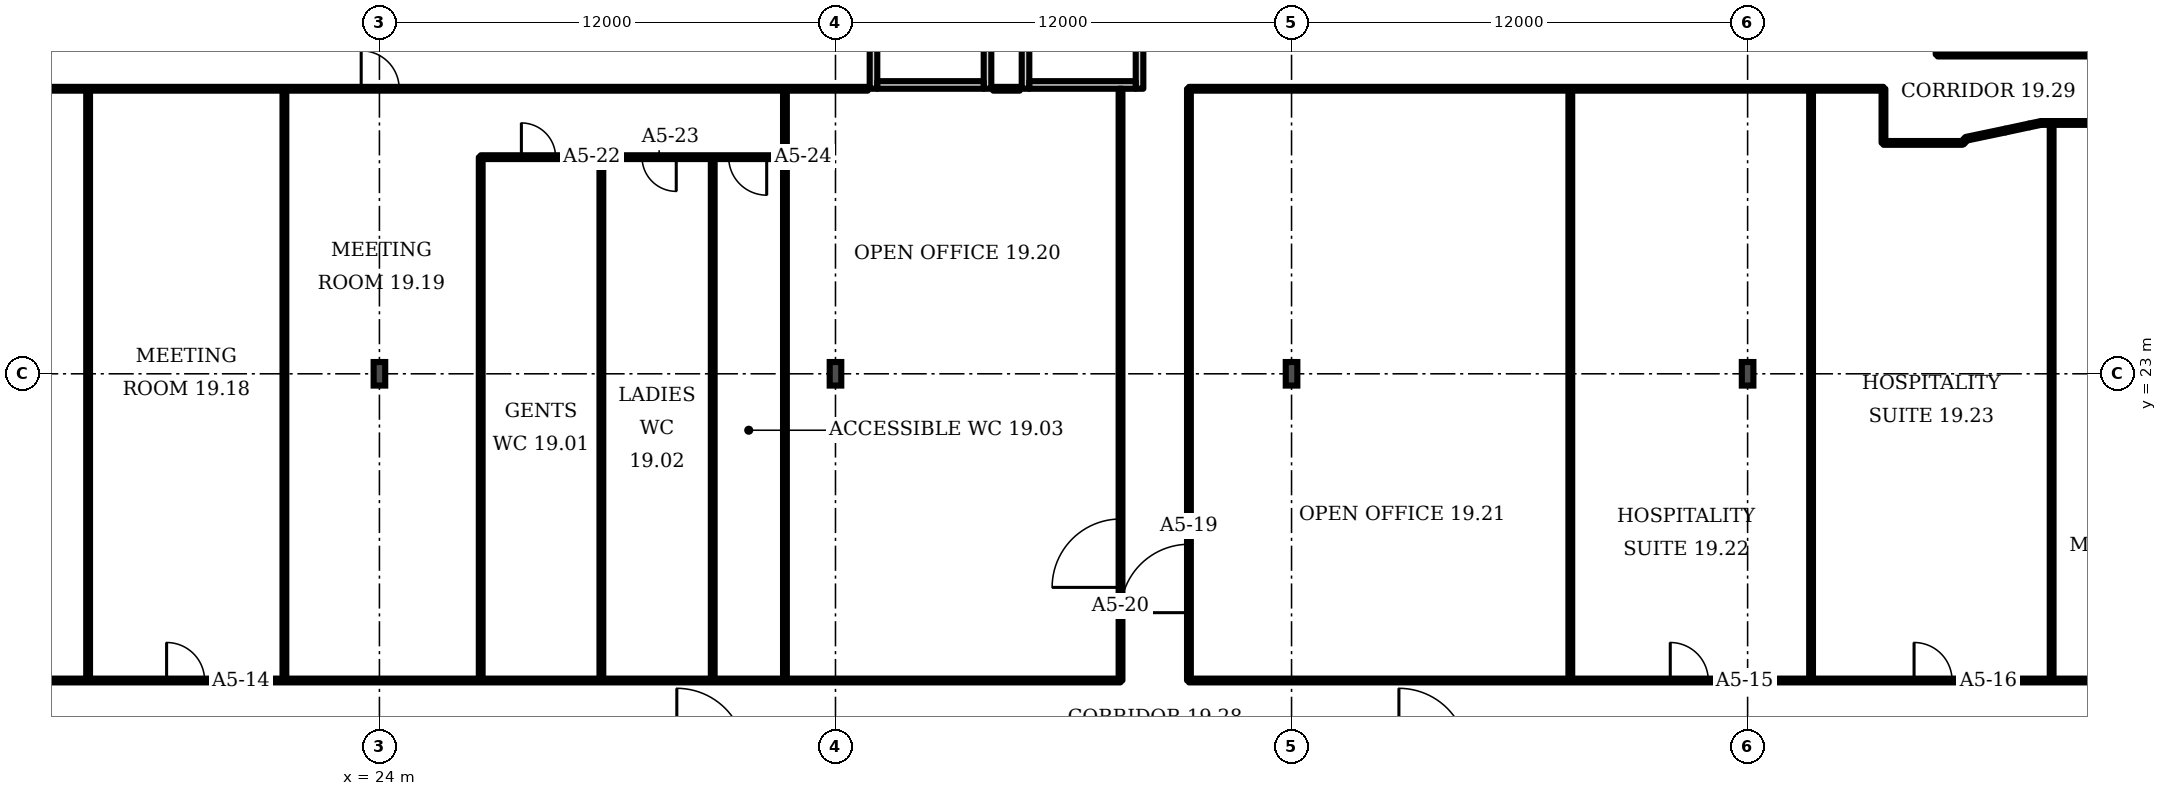
"""IFC4 building model, lengths in metres.
Left out: names, types, materials, properties, quantities, classifications, styles, units other than length and angle.
Written with IfcOpenShell. Run it as: python <this file> out.ifc"""

import sys

from ifc_helpers import new_model, si_unit, direction, frame, frame_2d, origin, origin_2d, place, context, subcontext, project, spatial, rectangle, i_section, extrude, element, fill, save


model = new_model("IFC4")
c1 = context("Model", 3, precision=1e-05, world=origin(), true_north=direction((0.0, 1.0)))
c2 = subcontext(c1, "Body", "Model", "MODEL_VIEW")
j1 = project(units=[si_unit("LENGTHUNIT", "METRE"), si_unit("PLANEANGLEUNIT", "RADIAN")], contexts=[c1])
p1 = place(None, origin())
s1 = spatial("IfcSite", under=j1, at=p1, CompositionType="ELEMENT")
p2 = place(p1, origin())
s2 = spatial("IfcBuilding", under=s1, at=p2, CompositionType="ELEMENT")
p3 = place(p2, frame((0.0, 0.0, 88.3)))
s3 = spatial("IfcBuildingStorey", under=s2, at=p3, CompositionType="ELEMENT", Elevation=88.3)
for number, where, z_axis, x_axis in (
    (1, (24.0, 23.0, 0.0), (0.0, 0.0, 1.0), (1.0, 0.0, 0.0)),
    (2, (36.0, 23.0, 0.0), (0.0, 0.0, 1.0), (1.0, 0.0, 0.0)),
    (3, (48.0, 23.0, 0.0), (0.0, 0.0, 1.0), (1.0, 0.0, 0.0)),
    (4, (60.0, 23.0, 0.0), (0.0, 0.0, 1.0), (1.0, 0.0, 0.0)),
):
    element("IfcColumn", number, at=place(p3, frame(where, z_axis=z_axis, x_axis=x_axis)), inside=s3, PredefinedType="COLUMN", context=c2, shape_type="SweptSolid", body=[
        extrude(i_section(OverallWidth=0.305, OverallDepth=0.62, WebThickness=0.021, FlangeThickness=0.04, FilletRadius=0.027, at=origin_2d()), origin(), (0.0, 0.0, 1.0), 3.6),
    ])
p4 = place(p3, frame((37.0, 30.5, 0.0), z_axis=(0.0, 0.0, 1.0), x_axis=(0.0, 1.0, 0.0)))
e5 = element("IfcWall", 5, at=p4, inside=s3, PredefinedType="PARTITIONING", context=c2, shape_type="SweptSolid", body=[
    extrude(rectangle(XDim=3.5, YDim=0.2, at=frame_2d((1.75, 0.0))), origin(), (0.0, 0.0, 1.0), 3.15),
])
p5 = place(p4, frame((1.2, 0.0, 0.0)))
e6 = element("IfcOpeningElement", 6, at=p5, cuts=e5, PredefinedType="OPENING", context=c2, shape_type="SweptSolid", body=[
    extrude(rectangle(XDim=1.1, YDim=2.1, at=frame_2d((0.55, 1.05))), frame((0.0, 0.11, 0.0), z_axis=(0.0, -1.0, 0.0), x_axis=(1.0, 0.0, 0.0)), (0.0, 0.0, 1.0), 0.22),
])
p6 = place(p3, frame((40.0, 30.5, 0.0), z_axis=(0.0, 0.0, 1.0), x_axis=(0.0, 1.0, 0.0)))
e7 = element("IfcWall", 7, at=p6, inside=s3, PredefinedType="PARTITIONING", context=c2, shape_type="SweptSolid", body=[
    extrude(rectangle(XDim=3.5, YDim=0.2, at=frame_2d((1.75, 0.0))), origin(), (0.0, 0.0, 1.0), 3.15),
])
p7 = place(p3, frame((37.1, 30.6, 0.0), z_axis=(0.0, 0.0, 1.0), x_axis=(1.0, 0.0, 0.0)))
e8 = element("IfcWall", 8, at=p7, inside=s3, PredefinedType="PARTITIONING", context=c2, shape_type="SweptSolid", body=[
    extrude(rectangle(XDim=2.8, YDim=0.2, at=frame_2d((1.4, 0.0))), origin(), (0.0, 0.0, 1.0), 3.15),
])
p8 = place(p3, frame((41.0, 30.5, 0.0), z_axis=(0.0, 0.0, 1.0), x_axis=(0.0, 1.0, 0.0)))
e9 = element("IfcWall", 9, at=p8, inside=s3, PredefinedType="PARTITIONING", context=c2, shape_type="SweptSolid", body=[
    extrude(rectangle(XDim=3.5, YDim=0.2, at=frame_2d((1.75, 0.0))), origin(), (0.0, 0.0, 1.0), 3.15),
])
p9 = place(p3, frame((44.0, 30.5, 0.0), z_axis=(0.0, 0.0, 1.0), x_axis=(0.0, 1.0, 0.0)))
e10 = element("IfcWall", 10, at=p9, inside=s3, PredefinedType="PARTITIONING", context=c2, shape_type="SweptSolid", body=[
    extrude(rectangle(XDim=3.5, YDim=0.2, at=frame_2d((1.75, 0.0))), origin(), (0.0, 0.0, 1.0), 3.15),
])
p10 = place(p9, frame((1.2, 0.0, 0.0)))
e11 = element("IfcOpeningElement", 11, at=p10, cuts=e10, PredefinedType="OPENING", context=c2, shape_type="SweptSolid", body=[
    extrude(rectangle(XDim=1.1, YDim=2.1, at=frame_2d((0.55, 1.05))), frame((0.0, 0.11, 0.0), z_axis=(0.0, -1.0, 0.0), x_axis=(1.0, 0.0, 0.0)), (0.0, 0.0, 1.0), 0.22),
])
p11 = place(p3, frame((41.1, 30.6, 0.0), z_axis=(0.0, 0.0, 1.0), x_axis=(1.0, 0.0, 0.0)))
e12 = element("IfcWall", 12, at=p11, inside=s3, PredefinedType="PARTITIONING", context=c2, shape_type="SweptSolid", body=[
    extrude(rectangle(XDim=2.8, YDim=0.2, at=frame_2d((1.4, 0.0))), origin(), (0.0, 0.0, 1.0), 3.15),
])
p12 = place(p3, frame((9.0, 30.5, 0.0), z_axis=(0.0, 0.0, 1.0), x_axis=(1.0, 0.0, 0.0)))
e13 = element("IfcWall", 13, at=p12, inside=s3, PredefinedType="PARTITIONING", context=c2, shape_type="SweptSolid", body=[
    extrude(rectangle(XDim=27.85, YDim=0.1, at=frame_2d((13.925, 0.0))), origin(), (0.0, 0.0, 1.0), 3.15),
])
p13 = place(p12, frame((14.52, 0.0, 0.0)))
e14 = element("IfcOpeningElement", 14, at=p13, cuts=e13, PredefinedType="OPENING", context=c2, shape_type="SweptSolid", body=[
    extrude(rectangle(XDim=1.0, YDim=2.1, at=frame_2d((0.5, 1.05))), frame((0.0, 0.06, 0.0), z_axis=(0.0, -1.0, 0.0), x_axis=(1.0, 0.0, 0.0)), (0.0, 0.0, 1.0), 0.12),
])
p14 = place(p3, frame((10.8, 14.93, 0.0), z_axis=(0.0, 0.0, 1.0), x_axis=(1.0, 0.0, 0.0)))
e15 = element("IfcWall", 15, at=p14, inside=s3, PredefinedType="PARTITIONING", context=c2, shape_type="SweptSolid", body=[
    extrude(rectangle(XDim=32.7, YDim=0.1, at=frame_2d((16.35, 0.0))), origin(), (0.0, 0.0, 1.0), 3.15),
])
p15 = place(p14, frame((7.6, 0.0, 0.0)))
e16 = element("IfcOpeningElement", 16, at=p15, cuts=e15, PredefinedType="OPENING", context=c2, shape_type="SweptSolid", body=[
    extrude(rectangle(XDim=1.0, YDim=2.1, at=frame_2d((0.5, 1.05))), frame((0.0, 0.06, 0.0), z_axis=(0.0, -1.0, 0.0), x_axis=(1.0, 0.0, 0.0)), (0.0, 0.0, 1.0), 0.12),
])
for number, where, z_axis, x_axis in (
    (17, (16.335, 14.93, 0.0), (0.0, 0.0, 1.0), (0.0, 1.0, 0.0)),
    (18, (21.5, 14.93, 0.0), (0.0, 0.0, 1.0), (0.0, 1.0, 0.0)),
):
    element("IfcWall", number, at=place(p3, frame(where, z_axis=z_axis, x_axis=x_axis)), inside=s3, PredefinedType="PARTITIONING", context=c2, shape_type="SweptSolid", body=[
        extrude(rectangle(XDim=15.57, YDim=0.1, at=frame_2d((7.785, 0.0))), origin(), (0.0, 0.0, 1.0), 3.15),
    ])
p16 = place(p3, frame((26.665, 14.93, 0.0), z_axis=(0.0, 0.0, 1.0), x_axis=(0.0, 1.0, 0.0)))
e19 = element("IfcWall", 19, at=p16, inside=s3, PredefinedType="PARTITIONING", context=c2, shape_type="SweptSolid", body=[
    extrude(rectangle(XDim=13.77, YDim=0.1, at=frame_2d((6.885, 0.0))), origin(), (0.0, 0.0, 1.0), 3.15),
])
p17 = place(p3, frame((26.665, 28.7, 0.0), z_axis=(0.0, 0.0, 1.0), x_axis=(1.0, 0.0, 0.0)))
e20 = element("IfcWall", 20, at=p17, inside=s3, PredefinedType="PARTITIONING", context=c2, shape_type="SweptSolid", body=[
    extrude(rectangle(XDim=8.0, YDim=0.1, at=frame_2d((4.0, 0.0))), origin(), (0.0, 0.0, 1.0), 3.15),
])
p18 = place(p17, frame((1.07, 0.0, 0.0)))
e21 = element("IfcOpeningElement", 21, at=p18, cuts=e20, PredefinedType="OPENING", context=c2, shape_type="SweptSolid", body=[
    extrude(rectangle(XDim=0.9, YDim=2.1, at=frame_2d((0.45, 1.05))), frame((0.0, 0.06, 0.0), z_axis=(0.0, -1.0, 0.0), x_axis=(1.0, 0.0, 0.0)), (0.0, 0.0, 1.0), 0.12),
])
p19 = place(p17, frame((4.245, 0.0, 0.0)))
e22 = element("IfcOpeningElement", 22, at=p19, cuts=e20, PredefinedType="OPENING", context=c2, shape_type="SweptSolid", body=[
    extrude(rectangle(XDim=0.9, YDim=2.1, at=frame_2d((0.45, 1.05))), frame((0.0, 0.06, 0.0), z_axis=(0.0, -1.0, 0.0), x_axis=(1.0, 0.0, 0.0)), (0.0, 0.0, 1.0), 0.12),
])
p20 = place(p17, frame((6.525, 0.0, 0.0)))
e23 = element("IfcOpeningElement", 23, at=p20, cuts=e20, PredefinedType="OPENING", context=c2, shape_type="SweptSolid", body=[
    extrude(rectangle(XDim=1.0, YDim=2.1, at=frame_2d((0.5, 1.05))), frame((0.0, 0.06, 0.0), z_axis=(0.0, -1.0, 0.0), x_axis=(1.0, 0.0, 0.0)), (0.0, 0.0, 1.0), 0.12),
])
for number, where, z_axis, x_axis in (
    (24, (29.84, 14.93, 0.0), (0.0, 0.0, 1.0), (0.0, 1.0, 0.0)),
    (25, (32.77, 14.93, 0.0), (0.0, 0.0, 1.0), (0.0, 1.0, 0.0)),
):
    element("IfcWall", number, at=place(p3, frame(where, z_axis=z_axis, x_axis=x_axis)), inside=s3, PredefinedType="PARTITIONING", context=c2, shape_type="SweptSolid", body=[
        extrude(rectangle(XDim=13.77, YDim=0.1, at=frame_2d((6.885, 0.0))), origin(), (0.0, 0.0, 1.0), 3.15),
    ])
p21 = place(p3, frame((34.67, 14.93, 0.0), z_axis=(0.0, 0.0, 1.0), x_axis=(0.0, 1.0, 0.0)))
e26 = element("IfcWall", 26, at=p21, inside=s3, PredefinedType="PARTITIONING", context=c2, shape_type="SweptSolid", body=[
    extrude(rectangle(XDim=15.56, YDim=0.1, at=frame_2d((7.78, 0.0))), origin(), (0.0, 0.0, 1.0), 3.15),
])
p22 = place(p3, frame((43.5, 14.93, 0.0), z_axis=(0.0, 0.0, 1.0), x_axis=(0.0, 1.0, 0.0)))
e27 = element("IfcWall", 27, at=p22, inside=s3, PredefinedType="PARTITIONING", context=c2, shape_type="SweptSolid", body=[
    extrude(rectangle(XDim=15.57, YDim=0.1, at=frame_2d((7.785, 0.0))), origin(), (0.0, 0.0, 1.0), 3.15),
])
p23 = place(p22, frame((2.45, 0.0, 0.0)))
e28 = element("IfcOpeningElement", 28, at=p23, cuts=e27, PredefinedType="OPENING", context=c2, shape_type="SweptSolid", body=[
    extrude(rectangle(XDim=1.8, YDim=2.1, at=frame_2d((0.9, 1.05))), frame((0.0, 0.06, 0.0), z_axis=(0.0, -1.0, 0.0), x_axis=(1.0, 0.0, 0.0)), (0.0, 0.0, 1.0), 0.12),
])
p24 = place(p3, frame((45.3, 14.93, 0.0), z_axis=(0.0, 0.0, 1.0), x_axis=(0.0, 1.0, 0.0)))
e29 = element("IfcWall", 29, at=p24, inside=s3, PredefinedType="PARTITIONING", context=c2, shape_type="SweptSolid", body=[
    extrude(rectangle(XDim=15.57, YDim=0.1, at=frame_2d((7.785, 0.0))), origin(), (0.0, 0.0, 1.0), 3.15),
])
p25 = place(p24, frame((1.785, 0.0, 0.0)))
e30 = element("IfcOpeningElement", 30, at=p25, cuts=e29, PredefinedType="OPENING", context=c2, shape_type="SweptSolid", body=[
    extrude(rectangle(XDim=1.8, YDim=2.1, at=frame_2d((0.9, 1.05))), frame((0.0, 0.06, 0.0), z_axis=(0.0, -1.0, 0.0), x_axis=(1.0, 0.0, 0.0)), (0.0, 0.0, 1.0), 0.12),
])
p26 = place(p3, frame((45.3, 14.93, 0.0), z_axis=(0.0, 0.0, 1.0), x_axis=(1.0, 0.0, 0.0)))
e31 = element("IfcWall", 31, at=p26, inside=s3, PredefinedType="PARTITIONING", context=c2, shape_type="SweptSolid", body=[
    extrude(rectangle(XDim=40.43, YDim=0.1, at=frame_2d((20.215, 0.0))), origin(), (0.0, 0.0, 1.0), 3.15),
])
p27 = place(p26, frame((12.665, 0.0, 0.0)))
e32 = element("IfcOpeningElement", 32, at=p27, cuts=e31, PredefinedType="OPENING", context=c2, shape_type="SweptSolid", body=[
    extrude(rectangle(XDim=1.0, YDim=2.1, at=frame_2d((0.5, 1.05))), frame((0.0, 0.06, 0.0), z_axis=(0.0, -1.0, 0.0), x_axis=(1.0, 0.0, 0.0)), (0.0, 0.0, 1.0), 0.12),
])
p28 = place(p26, frame((19.08, 0.0, 0.0)))
e33 = element("IfcOpeningElement", 33, at=p28, cuts=e31, PredefinedType="OPENING", context=c2, shape_type="SweptSolid", body=[
    extrude(rectangle(XDim=1.0, YDim=2.1, at=frame_2d((0.5, 1.05))), frame((0.0, 0.06, 0.0), z_axis=(0.0, -1.0, 0.0), x_axis=(1.0, 0.0, 0.0)), (0.0, 0.0, 1.0), 0.12),
])
p29 = place(p26, frame((37.015, 0.0, 0.0)))
e34 = element("IfcOpeningElement", 34, at=p29, cuts=e31, PredefinedType="OPENING", context=c2, shape_type="SweptSolid", body=[
    extrude(rectangle(XDim=1.0, YDim=2.1, at=frame_2d((0.5, 1.05))), frame((0.0, 0.06, 0.0), z_axis=(0.0, -1.0, 0.0), x_axis=(1.0, 0.0, 0.0)), (0.0, 0.0, 1.0), 0.12),
])
p30 = place(p3, frame((45.3, 30.5, 0.0), z_axis=(0.0, 0.0, 1.0), x_axis=(1.0, 0.0, 0.0)))
e35 = element("IfcWall", 35, at=p30, inside=s3, PredefinedType="PARTITIONING", context=c2, shape_type="SweptSolid", body=[
    extrude(rectangle(XDim=18.275, YDim=0.1, at=frame_2d((9.137, 0.0))), origin(), (0.0, 0.0, 1.0), 3.15),
])
for number, where, z_axis, x_axis in (
    (36, (55.335, 14.93, 0.0), (0.0, 0.0, 1.0), (0.0, 1.0, 0.0)),
    (37, (61.67, 14.93, 0.0), (0.0, 0.0, 1.0), (0.0, 1.0, 0.0)),
):
    element("IfcWall", number, at=place(p3, frame(where, z_axis=z_axis, x_axis=x_axis)), inside=s3, PredefinedType="PARTITIONING", context=c2, shape_type="SweptSolid", body=[
        extrude(rectangle(XDim=15.57, YDim=0.1, at=frame_2d((7.785, 0.0))), origin(), (0.0, 0.0, 1.0), 3.15),
    ])
p31 = place(p3, frame((63.575, 29.075, 0.0), z_axis=(0.0, 0.0, 1.0), x_axis=(0.0, 1.0, 0.0)))
e38 = element("IfcWall", 38, at=p31, inside=s3, PredefinedType="PARTITIONING", context=c2, shape_type="SweptSolid", body=[
    extrude(rectangle(XDim=1.425, YDim=0.1, at=frame_2d((0.712, 0.0))), origin(), (0.0, 0.0, 1.0), 3.15),
])
p32 = place(p3, frame((63.575, 29.075, 0.0), z_axis=(0.0, 0.0, 1.0), x_axis=(1.0, 0.0, 0.0)))
e39 = element("IfcWall", 39, at=p32, inside=s3, PredefinedType="PARTITIONING", context=c2, shape_type="SweptSolid", body=[
    extrude(rectangle(XDim=2.08, YDim=0.1, at=frame_2d((1.04, 0.0))), origin(), (0.0, 0.0, 1.0), 3.15),
])
p33 = place(p3, frame((65.0, 31.4, 0.0), z_axis=(0.0, 0.0, 1.0), x_axis=(0.0, 1.0, 0.0)))
e40 = element("IfcWall", 40, at=p33, inside=s3, PredefinedType="PARTITIONING", context=c2, shape_type="SweptSolid", body=[
    extrude(rectangle(XDim=2.58, YDim=0.1, at=frame_2d((1.29, 0.0))), origin(), (0.0, 0.0, 1.0), 3.15),
])
p34 = place(p33, frame((0.9, 0.0, 0.0)))
e41 = element("IfcOpeningElement", 41, at=p34, cuts=e40, PredefinedType="OPENING", context=c2, shape_type="SweptSolid", body=[
    extrude(rectangle(XDim=1.0, YDim=2.1, at=frame_2d((0.5, 1.05))), frame((0.0, 0.06, 0.0), z_axis=(0.0, -1.0, 0.0), x_axis=(1.0, 0.0, 0.0)), (0.0, 0.0, 1.0), 0.12),
])
p35 = place(p3, frame((65.0, 31.4, 0.0), z_axis=(0.0, 0.0, 1.0), x_axis=(1.0, 0.0, 0.0)))
e42 = element("IfcWall", 42, at=p35, inside=s3, PredefinedType="PARTITIONING", context=c2, shape_type="SweptSolid", body=[
    extrude(rectangle(XDim=7.125, YDim=0.1, at=frame_2d((3.562, 0.0))), origin(), (0.0, 0.0, 1.0), 3.15),
])
p36 = place(p35, frame((5.705, 0.0, 0.0)))
e43 = element("IfcOpeningElement", 43, at=p36, cuts=e42, PredefinedType="OPENING", context=c2, shape_type="SweptSolid", body=[
    extrude(rectangle(XDim=1.0, YDim=2.1, at=frame_2d((0.5, 1.05))), frame((0.0, 0.06, 0.0), z_axis=(0.0, -1.0, 0.0), x_axis=(1.0, 0.0, 0.0)), (0.0, 0.0, 1.0), 0.12),
])
p37 = place(p3, frame((65.655, 29.075, 0.0), z_axis=(0.0, 0.0, 1.0), x_axis=(0.671773, 0.740757, 0.0)))
e44 = element("IfcWall", 44, at=p37, inside=s3, PredefinedType="PARTITIONING", context=c2, shape_type="SweptSolid", body=[
    extrude(rectangle(XDim=0.149, YDim=0.1, at=frame_2d((0.074, 0.0))), origin(), (0.0, 0.0, 1.0), 3.15),
])
p38 = place(p3, frame((65.755, 29.185, 0.0), z_axis=(0.0, 0.0, 1.0), x_axis=(0.978739, 0.205118, 0.0)))
e45 = element("IfcWall", 45, at=p38, inside=s3, PredefinedType="PARTITIONING", context=c2, shape_type="SweptSolid", body=[
    extrude(rectangle(XDim=1.047, YDim=0.1, at=frame_2d((0.524, 0.0))), origin(), (0.0, 0.0, 1.0), 3.15),
])
p39 = place(p3, frame((66.78, 29.4, 0.0), z_axis=(0.0, 0.0, 1.0), x_axis=(0.977792, 0.209581, 0.0)))
e46 = element("IfcWall", 46, at=p39, inside=s3, PredefinedType="PARTITIONING", context=c2, shape_type="SweptSolid", body=[
    extrude(rectangle(XDim=0.644, YDim=0.1, at=frame_2d((0.322, 0.0))), origin(), (0.0, 0.0, 1.0), 3.15),
])
p40 = place(p3, frame((67.41, 29.535, 0.0), z_axis=(0.0, 0.0, 1.0), x_axis=(0.978604, 0.205738, 0.0)))
e47 = element("IfcWall", 47, at=p40, inside=s3, PredefinedType="PARTITIONING", context=c2, shape_type="SweptSolid", body=[
    extrude(rectangle(XDim=0.317, YDim=0.1, at=frame_2d((0.158, 0.0))), origin(), (0.0, 0.0, 1.0), 3.15),
])
p41 = place(p3, frame((67.72, 29.6, 0.0), z_axis=(0.0, 0.0, 1.0), x_axis=(1.0, 0.0, 0.0)))
e48 = element("IfcWall", 48, at=p41, inside=s3, PredefinedType="PARTITIONING", context=c2, shape_type="SweptSolid", body=[
    extrude(rectangle(XDim=2.605, YDim=0.1, at=frame_2d((1.302, 0.0))), origin(), (0.0, 0.0, 1.0), 3.15),
])
p42 = place(p3, frame((68.0, 14.93, 0.0), z_axis=(0.0, 0.0, 1.0), x_axis=(0.0, 1.0, 0.0)))
e49 = element("IfcWall", 49, at=p42, inside=s3, PredefinedType="PARTITIONING", context=c2, shape_type="SweptSolid", body=[
    extrude(rectangle(XDim=14.67, YDim=0.1, at=frame_2d((7.335, 0.0))), origin(), (0.0, 0.0, 1.0), 3.15),
])
p43 = place(p3, frame((68.0, 31.4, 0.0), z_axis=(0.0, 0.0, 1.0), x_axis=(0.0, 1.0, 0.0)))
e50 = element("IfcWall", 50, at=p43, inside=s3, PredefinedType="PARTITIONING", context=c2, shape_type="SweptSolid", body=[
    extrude(rectangle(XDim=8.39, YDim=0.1, at=frame_2d((4.195, 0.0))), origin(), (0.0, 0.0, 1.0), 3.15),
])
p44 = place(p3, frame((40.15, 30.5, 0.0), z_axis=(0.0, 0.0, 1.0), x_axis=(1.0, 0.0, 0.0)))
e51 = element("IfcWall", 51, at=p44, inside=s3, PredefinedType="PARTITIONING", context=c2, shape_type="SweptSolid", body=[
    extrude(rectangle(XDim=0.7, YDim=0.1, at=frame_2d((0.35, 0.0))), origin(), (0.0, 0.0, 1.0), 3.15),
])
p45 = place(p15, origin())
e52 = element("IfcDoor", 52, at=p45, inside=s3, OperationType="SINGLE_SWING_LEFT", PredefinedType="DOOR", context=c2, shape_type="SweptSolid", body=[
    extrude(rectangle(XDim=1.0, YDim=2.1, at=frame_2d((0.5, 1.05))), frame((0.0, 0.025, 0.0), z_axis=(0.0, -1.0, 0.0), x_axis=(1.0, 0.0, 0.0)), (0.0, 0.0, 1.0), 0.05),
])
fill(e16, e52)
p46 = place(p27, origin())
e53 = element("IfcDoor", 53, at=p46, inside=s3, OperationType="SINGLE_SWING_LEFT", PredefinedType="DOOR", context=c2, shape_type="SweptSolid", body=[
    extrude(rectangle(XDim=1.0, YDim=2.1, at=frame_2d((0.5, 1.05))), frame((0.0, 0.025, 0.0), z_axis=(0.0, -1.0, 0.0), x_axis=(1.0, 0.0, 0.0)), (0.0, 0.0, 1.0), 0.05),
])
fill(e32, e53)
p47 = place(p28, origin())
e54 = element("IfcDoor", 54, at=p47, inside=s3, OperationType="SINGLE_SWING_LEFT", PredefinedType="DOOR", context=c2, shape_type="SweptSolid", body=[
    extrude(rectangle(XDim=1.0, YDim=2.1, at=frame_2d((0.5, 1.05))), frame((0.0, 0.025, 0.0), z_axis=(0.0, -1.0, 0.0), x_axis=(1.0, 0.0, 0.0)), (0.0, 0.0, 1.0), 0.05),
])
fill(e33, e54)
p48 = place(p25, origin())
e55 = element("IfcDoor", 55, at=p48, inside=s3, OperationType="DOUBLE_DOOR_SINGLE_SWING", PredefinedType="DOOR", context=c2, shape_type="SweptSolid", body=[
    extrude(rectangle(XDim=1.8, YDim=2.1, at=frame_2d((0.9, 1.05))), frame((0.0, 0.025, 0.0), z_axis=(0.0, -1.0, 0.0), x_axis=(1.0, 0.0, 0.0)), (0.0, 0.0, 1.0), 0.05),
])
fill(e30, e55)
p49 = place(p23, origin())
e56 = element("IfcDoor", 56, at=p49, inside=s3, OperationType="DOUBLE_DOOR_SINGLE_SWING", PredefinedType="DOOR", context=c2, shape_type="SweptSolid", body=[
    extrude(rectangle(XDim=1.8, YDim=2.1, at=frame_2d((0.9, 1.05))), frame((0.0, 0.025, 0.0), z_axis=(0.0, -1.0, 0.0), x_axis=(1.0, 0.0, 0.0)), (0.0, 0.0, 1.0), 0.05),
])
fill(e28, e56)
p50 = place(p18, origin())
e57 = element("IfcDoor", 57, at=p50, inside=s3, OperationType="SINGLE_SWING_LEFT", PredefinedType="DOOR", context=c2, shape_type="SweptSolid", body=[
    extrude(rectangle(XDim=0.9, YDim=2.1, at=frame_2d((0.45, 1.05))), frame((0.0, 0.025, 0.0), z_axis=(0.0, -1.0, 0.0), x_axis=(1.0, 0.0, 0.0)), (0.0, 0.0, 1.0), 0.05),
])
fill(e21, e57)
p51 = place(p19, origin())
e58 = element("IfcDoor", 58, at=p51, inside=s3, OperationType="SINGLE_SWING_RIGHT", PredefinedType="DOOR", context=c2, shape_type="SweptSolid", body=[
    extrude(rectangle(XDim=0.9, YDim=2.1, at=frame_2d((0.45, 1.05))), frame((0.0, 0.025, 0.0), z_axis=(0.0, -1.0, 0.0), x_axis=(1.0, 0.0, 0.0)), (0.0, 0.0, 1.0), 0.05),
])
fill(e22, e58)
p52 = place(p20, origin())
e59 = element("IfcDoor", 59, at=p52, inside=s3, OperationType="SINGLE_SWING_RIGHT", PredefinedType="DOOR", context=c2, shape_type="SweptSolid", body=[
    extrude(rectangle(XDim=1.0, YDim=2.1, at=frame_2d((0.5, 1.05))), frame((0.0, 0.025, 0.0), z_axis=(0.0, -1.0, 0.0), x_axis=(1.0, 0.0, 0.0)), (0.0, 0.0, 1.0), 0.05),
])
fill(e23, e59)
p53 = place(p13, origin())
e60 = element("IfcDoor", 60, at=p53, inside=s3, OperationType="SINGLE_SWING_LEFT", PredefinedType="DOOR", context=c2, shape_type="SweptSolid", body=[
    extrude(rectangle(XDim=1.0, YDim=2.1, at=frame_2d((0.5, 1.05))), frame((0.0, 0.025, 0.0), z_axis=(0.0, -1.0, 0.0), x_axis=(1.0, 0.0, 0.0)), (0.0, 0.0, 1.0), 0.05),
])
fill(e14, e60)
save(model, sys.argv[1])
